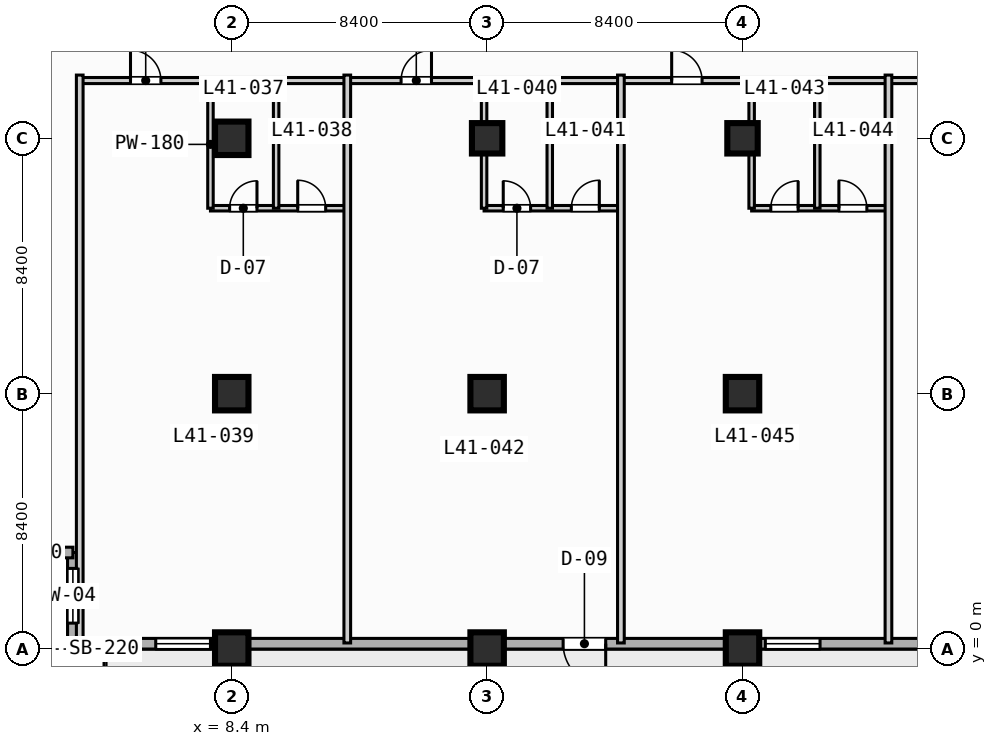
"""IFC4 building model, lengths in metres.
Left out: names, types, materials, properties, quantities, classifications, styles, units other than length and angle.
Written with IfcOpenShell. Run it as: python <this file> out.ifc"""

import sys

from ifc_helpers import new_model, si_unit, direction, frame, frame_2d, origin, origin_2d, place, context, subcontext, project, spatial, rectangle, extrude, element, fill, save


model = new_model("IFC4")
c1 = context("Model", 3, precision=1e-05, world=origin(), true_north=direction((0.0, 1.0)))
c2 = subcontext(c1, "Body", "Model", "MODEL_VIEW")
j1 = project(units=[si_unit("LENGTHUNIT", "METRE"), si_unit("PLANEANGLEUNIT", "RADIAN")], contexts=[c1])
p1 = place(None, origin())
s1 = spatial("IfcSite", under=j1, at=p1, CompositionType="ELEMENT")
p2 = place(p1, origin())
s2 = spatial("IfcBuilding", under=s1, at=p2, CompositionType="ELEMENT")
p3 = place(p2, frame((0.0, 0.0, 171.7)))
s3 = spatial("IfcBuildingStorey", under=s2, at=p3, CompositionType="ELEMENT", Elevation=171.7)
for number, where, z_axis, x_axis in (
    (1, (8.4, 0.0, 0.0), (0.0, 0.0, 1.0), (1.0, 0.0, 0.0)),
    (2, (8.4, 8.4, 0.0), (0.0, 0.0, 1.0), (1.0, 0.0, 0.0)),
    (3, (8.4, 16.8, 0.0), (0.0, 0.0, 1.0), (1.0, 0.0, 0.0)),
    (4, (16.8, 0.0, 0.0), (0.0, 0.0, 1.0), (1.0, 0.0, 0.0)),
    (5, (16.8, 8.4, 0.0), (0.0, 0.0, 1.0), (1.0, 0.0, 0.0)),
):
    element("IfcColumn", number, at=place(p3, frame(where, z_axis=z_axis, x_axis=x_axis)), inside=s3, PredefinedType="COLUMN", context=c2, shape_type="SweptSolid", body=[
        extrude(rectangle(XDim=1.1, YDim=1.1, at=origin_2d()), origin(), (0.0, 0.0, 1.0), 3.7),
    ])
p4 = place(p3, frame((16.8, 16.8, 0.0), z_axis=(0.0, 0.0, 1.0), x_axis=(1.0, 0.0, 0.0)))
e6 = element("IfcColumn", 6, at=p4, inside=s3, PredefinedType="COLUMN", context=c2, shape_type="SweptSolid", body=[
    extrude(rectangle(XDim=1.0, YDim=1.0, at=origin_2d()), origin(), (0.0, 0.0, 1.0), 3.7),
])
for number, where, z_axis, x_axis in (
    (7, (25.2, 0.0, 0.0), (0.0, 0.0, 1.0), (1.0, 0.0, 0.0)),
    (8, (25.2, 8.4, 0.0), (0.0, 0.0, 1.0), (1.0, 0.0, 0.0)),
):
    element("IfcColumn", number, at=place(p3, frame(where, z_axis=z_axis, x_axis=x_axis)), inside=s3, PredefinedType="COLUMN", context=c2, shape_type="SweptSolid", body=[
        extrude(rectangle(XDim=1.1, YDim=1.1, at=origin_2d()), origin(), (0.0, 0.0, 1.0), 3.7),
    ])
p5 = place(p3, frame((25.2, 16.8, 0.0), z_axis=(0.0, 0.0, 1.0), x_axis=(1.0, 0.0, 0.0)))
e9 = element("IfcColumn", 9, at=p5, inside=s3, PredefinedType="COLUMN", context=c2, shape_type="SweptSolid", body=[
    extrude(rectangle(XDim=1.0, YDim=1.0, at=origin_2d()), origin(), (0.0, 0.0, 1.0), 3.7),
])
p6 = place(p3, frame((3.175, 0.175, 0.0), z_axis=(0.0, 0.0, 1.0), x_axis=(0.0, 1.0, 0.0)))
e10 = element("IfcWall", 10, at=p6, inside=s3, PredefinedType="STANDARD", context=c2, shape_type="SweptSolid", body=[
    extrude(rectangle(XDim=3.0, YDim=0.35, at=frame_2d((1.5, 0.0))), origin(), (0.0, 0.0, 1.0), 3.47),
])
p7 = place(p6, frame((0.677, 0.0, 0.85)))
e11 = element("IfcOpeningElement", 11, at=p7, cuts=e10, PredefinedType="OPENING", context=c2, shape_type="SweptSolid", body=[
    extrude(rectangle(XDim=1.8, YDim=1.8, at=frame_2d((0.9, 0.9))), frame((0.0, 0.185, 0.0), z_axis=(0.0, -1.0, 0.0), x_axis=(1.0, 0.0, 0.0)), (0.0, 0.0, 1.0), 0.37),
])
p8 = place(p3, frame((3.175, 3.175, 0.0), z_axis=(0.0, 0.0, 1.0), x_axis=(-1.0, 0.0, 0.0)))
e12 = element("IfcWall", 12, at=p8, inside=s3, PredefinedType="STANDARD", context=c2, shape_type="SweptSolid", body=[
    extrude(rectangle(XDim=3.0, YDim=0.35, at=frame_2d((1.5, 0.0))), origin(), (0.0, 0.0, 1.0), 3.47),
])
p9 = place(p3, frame((72.425, 0.175, 0.0), z_axis=(0.0, 0.0, 1.0), x_axis=(-1.0, 0.0, 0.0)))
e13 = element("IfcWall", 13, at=p9, inside=s3, PredefinedType="STANDARD", context=c2, shape_type="SweptSolid", body=[
    extrude(rectangle(XDim=69.25, YDim=0.35, at=frame_2d((34.625, 0.0))), origin(), (0.0, 0.0, 1.0), 3.47),
])
p10 = place(p9, frame((51.725, 0.0, 0.0)))
e14 = element("IfcOpeningElement", 14, at=p10, cuts=e13, PredefinedType="OPENING", context=c2, shape_type="SweptSolid", body=[
    extrude(rectangle(XDim=1.4, YDim=2.2, at=frame_2d((0.7, 1.1))), frame((0.0, 0.185, 0.0), z_axis=(0.0, -1.0, 0.0), x_axis=(1.0, 0.0, 0.0)), (0.0, 0.0, 1.0), 0.37),
])
p11 = place(p9, frame((33.725, 0.0, 0.85)))
e15 = element("IfcOpeningElement", 15, at=p11, cuts=e13, PredefinedType="OPENING", context=c2, shape_type="SweptSolid", body=[
    extrude(rectangle(XDim=1.8, YDim=1.8, at=frame_2d((0.9, 0.9))), frame((0.0, 0.185, 0.0), z_axis=(0.0, -1.0, 0.0), x_axis=(1.0, 0.0, 0.0)), (0.0, 0.0, 1.0), 0.37),
])
p12 = place(p9, frame((25.025, 0.0, 0.85)))
e16 = element("IfcOpeningElement", 16, at=p12, cuts=e13, PredefinedType="OPENING", context=c2, shape_type="SweptSolid", body=[
    extrude(rectangle(XDim=2.4, YDim=1.95, at=frame_2d((1.2, 0.975))), frame((0.0, 0.185, 0.0), z_axis=(0.0, -1.0, 0.0), x_axis=(1.0, 0.0, 0.0)), (0.0, 0.0, 1.0), 0.37),
])
p13 = place(p9, frame((8.225, 0.0, 0.85)))
e17 = element("IfcOpeningElement", 17, at=p13, cuts=e13, PredefinedType="OPENING", context=c2, shape_type="SweptSolid", body=[
    extrude(rectangle(XDim=2.4, YDim=1.95, at=frame_2d((1.2, 0.975))), frame((0.0, 0.185, 0.0), z_axis=(0.0, -1.0, 0.0), x_axis=(1.0, 0.0, 0.0)), (0.0, 0.0, 1.0), 0.37),
])
p14 = place(p9, frame((64.725, 0.0, 0.85)))
e18 = element("IfcOpeningElement", 18, at=p14, cuts=e13, PredefinedType="OPENING", context=c2, shape_type="SweptSolid", body=[
    extrude(rectangle(XDim=1.8, YDim=1.8, at=frame_2d((0.9, 0.9))), frame((0.0, 0.185, 0.0), z_axis=(0.0, -1.0, 0.0), x_axis=(1.0, 0.0, 0.0)), (0.0, 0.0, 1.0), 0.37),
])
p15 = place(p9, frame((44.675, 0.0, 0.85)))
e19 = element("IfcOpeningElement", 19, at=p15, cuts=e13, PredefinedType="OPENING", context=c2, shape_type="SweptSolid", body=[
    extrude(rectangle(XDim=1.8, YDim=1.8, at=frame_2d((0.9, 0.9))), frame((0.0, 0.185, 0.0), z_axis=(0.0, -1.0, 0.0), x_axis=(1.0, 0.0, 0.0)), (0.0, 0.0, 1.0), 0.37),
])
p16 = place(p3, frame((3.4, 18.7, 0.0), z_axis=(0.0, 0.0, 1.0), x_axis=(1.0, 0.0, 0.0)))
e20 = element("IfcWall", 20, at=p16, inside=s3, PredefinedType="PARTITIONING", context=c2, shape_type="SweptSolid", body=[
    extrude(rectangle(XDim=35.8, YDim=0.2, at=frame_2d((17.9, 0.0))), origin(), (0.0, 0.0, 1.0), 3.47),
])
p17 = place(p16, frame((1.67, 0.0, 0.0)))
e21 = element("IfcOpeningElement", 21, at=p17, cuts=e20, PredefinedType="OPENING", context=c2, shape_type="SweptSolid", body=[
    extrude(rectangle(XDim=1.0, YDim=2.15, at=frame_2d((0.5, 1.075))), frame((0.0, 0.11, 0.0), z_axis=(0.0, -1.0, 0.0), x_axis=(1.0, 0.0, 0.0)), (0.0, 0.0, 1.0), 0.22),
])
p18 = place(p16, frame((10.57, 0.0, 0.0)))
e22 = element("IfcOpeningElement", 22, at=p18, cuts=e20, PredefinedType="OPENING", context=c2, shape_type="SweptSolid", body=[
    extrude(rectangle(XDim=1.0, YDim=2.15, at=frame_2d((0.5, 1.075))), frame((0.0, 0.11, 0.0), z_axis=(0.0, -1.0, 0.0), x_axis=(1.0, 0.0, 0.0)), (0.0, 0.0, 1.0), 0.22),
])
p19 = place(p16, frame((19.47, 0.0, 0.0)))
e23 = element("IfcOpeningElement", 23, at=p19, cuts=e20, PredefinedType="OPENING", context=c2, shape_type="SweptSolid", body=[
    extrude(rectangle(XDim=1.0, YDim=2.15, at=frame_2d((0.5, 1.075))), frame((0.0, 0.11, 0.0), z_axis=(0.0, -1.0, 0.0), x_axis=(1.0, 0.0, 0.0)), (0.0, 0.0, 1.0), 0.22),
])
p20 = place(p16, frame((28.22, 0.0, 0.0)))
e24 = element("IfcOpeningElement", 24, at=p20, cuts=e20, PredefinedType="OPENING", context=c2, shape_type="SweptSolid", body=[
    extrude(rectangle(XDim=1.0, YDim=2.15, at=frame_2d((0.5, 1.075))), frame((0.0, 0.11, 0.0), z_axis=(0.0, -1.0, 0.0), x_axis=(1.0, 0.0, 0.0)), (0.0, 0.0, 1.0), 0.22),
])
p21 = place(p3, frame((3.4, 0.2, 0.0), z_axis=(0.0, 0.0, 1.0), x_axis=(0.0, 1.0, 0.0)))
e25 = element("IfcWall", 25, at=p21, inside=s3, PredefinedType="PARTITIONING", context=c2, shape_type="SweptSolid", body=[
    extrude(rectangle(XDim=18.68, YDim=0.22, at=frame_2d((9.34, 0.0))), origin(), (0.0, 0.0, 1.0), 3.47),
])
p22 = place(p3, frame((7.7, 14.5, 0.0), z_axis=(0.0, 0.0, 1.0), x_axis=(1.0, 0.0, 0.0)))
e26 = element("IfcWall", 26, at=p22, inside=s3, PredefinedType="PLUMBINGWALL", context=c2, shape_type="SweptSolid", body=[
    extrude(rectangle(XDim=4.5, YDim=0.18, at=frame_2d((2.25, 0.0))), origin(), (0.0, 0.0, 1.0), 3.47),
])
p23 = place(p22, frame((0.63, 0.0, 0.0)))
e27 = element("IfcOpeningElement", 27, at=p23, cuts=e26, PredefinedType="OPENING", context=c2, shape_type="SweptSolid", body=[
    extrude(rectangle(XDim=0.9, YDim=2.1, at=frame_2d((0.45, 1.05))), frame((0.0, 0.1, 0.0), z_axis=(0.0, -1.0, 0.0), x_axis=(1.0, 0.0, 0.0)), (0.0, 0.0, 1.0), 0.2),
])
p24 = place(p22, frame((2.87, 0.0, 0.0)))
e28 = element("IfcOpeningElement", 28, at=p24, cuts=e26, PredefinedType="OPENING", context=c2, shape_type="SweptSolid", body=[
    extrude(rectangle(XDim=0.92, YDim=2.1, at=frame_2d((0.46, 1.05))), frame((0.0, 0.1, 0.0), z_axis=(0.0, -1.0, 0.0), x_axis=(1.0, 0.0, 0.0)), (0.0, 0.0, 1.0), 0.2),
])
for number, where, z_axis, x_axis in (
    (29, (7.7, 14.5, 0.0), (0.0, 0.0, 1.0), (0.0, 1.0, 0.0)),
    (30, (9.86, 14.5, 0.0), (0.0, 0.0, 1.0), (0.0, 1.0, 0.0)),
):
    element("IfcWall", number, at=place(p3, frame(where, z_axis=z_axis, x_axis=x_axis)), inside=s3, PredefinedType="PLUMBINGWALL", context=c2, shape_type="SweptSolid", body=[
        extrude(rectangle(XDim=4.2, YDim=0.18, at=frame_2d((2.1, 0.0))), origin(), (0.0, 0.0, 1.0), 3.47),
    ])
p25 = place(p3, frame((12.2, 0.2, 0.0), z_axis=(0.0, 0.0, 1.0), x_axis=(0.0, 1.0, 0.0)))
e31 = element("IfcWall", 31, at=p25, inside=s3, PredefinedType="PARTITIONING", context=c2, shape_type="SweptSolid", body=[
    extrude(rectangle(XDim=18.68, YDim=0.22, at=frame_2d((9.34, 0.0))), origin(), (0.0, 0.0, 1.0), 3.47),
])
p26 = place(p3, frame((16.7, 14.5, 0.0), z_axis=(0.0, 0.0, 1.0), x_axis=(1.0, 0.0, 0.0)))
e32 = element("IfcWall", 32, at=p26, inside=s3, PredefinedType="PLUMBINGWALL", context=c2, shape_type="SweptSolid", body=[
    extrude(rectangle(XDim=4.5, YDim=0.18, at=frame_2d((2.25, 0.0))), origin(), (0.0, 0.0, 1.0), 3.47),
])
p27 = place(p26, frame((0.63, 0.0, 0.0)))
e33 = element("IfcOpeningElement", 33, at=p27, cuts=e32, PredefinedType="OPENING", context=c2, shape_type="SweptSolid", body=[
    extrude(rectangle(XDim=0.9, YDim=2.1, at=frame_2d((0.45, 1.05))), frame((0.0, 0.1, 0.0), z_axis=(0.0, -1.0, 0.0), x_axis=(1.0, 0.0, 0.0)), (0.0, 0.0, 1.0), 0.2),
])
p28 = place(p26, frame((2.87, 0.0, 0.0)))
e34 = element("IfcOpeningElement", 34, at=p28, cuts=e32, PredefinedType="OPENING", context=c2, shape_type="SweptSolid", body=[
    extrude(rectangle(XDim=0.92, YDim=2.1, at=frame_2d((0.46, 1.05))), frame((0.0, 0.1, 0.0), z_axis=(0.0, -1.0, 0.0), x_axis=(1.0, 0.0, 0.0)), (0.0, 0.0, 1.0), 0.2),
])
p29 = place(p3, frame((16.7, 14.5, 0.0), z_axis=(0.0, 0.0, 1.0), x_axis=(0.0, 1.0, 0.0)))
e35 = element("IfcWall", 35, at=p29, inside=s3, PredefinedType="PLUMBINGWALL", context=c2, shape_type="SweptSolid", body=[
    extrude(rectangle(XDim=4.2, YDim=0.18, at=frame_2d((2.1, 0.0))), origin(), (0.0, 0.0, 1.0), 2.82),
])
p30 = place(p3, frame((18.86, 14.5, 0.0), z_axis=(0.0, 0.0, 1.0), x_axis=(0.0, 1.0, 0.0)))
e36 = element("IfcWall", 36, at=p30, inside=s3, PredefinedType="PLUMBINGWALL", context=c2, shape_type="SweptSolid", body=[
    extrude(rectangle(XDim=4.2, YDim=0.18, at=frame_2d((2.1, 0.0))), origin(), (0.0, 0.0, 1.0), 3.47),
])
p31 = place(p3, frame((21.2, 0.2, 0.0), z_axis=(0.0, 0.0, 1.0), x_axis=(0.0, 1.0, 0.0)))
e37 = element("IfcWall", 37, at=p31, inside=s3, PredefinedType="PARTITIONING", context=c2, shape_type="SweptSolid", body=[
    extrude(rectangle(XDim=18.68, YDim=0.22, at=frame_2d((9.34, 0.0))), origin(), (0.0, 0.0, 1.0), 3.47),
])
p32 = place(p3, frame((25.5, 14.5, 0.0), z_axis=(0.0, 0.0, 1.0), x_axis=(1.0, 0.0, 0.0)))
e38 = element("IfcWall", 38, at=p32, inside=s3, PredefinedType="PLUMBINGWALL", context=c2, shape_type="SweptSolid", body=[
    extrude(rectangle(XDim=4.5, YDim=0.18, at=frame_2d((2.25, 0.0))), origin(), (0.0, 0.0, 1.0), 3.47),
])
p33 = place(p32, frame((0.63, 0.0, 0.0)))
e39 = element("IfcOpeningElement", 39, at=p33, cuts=e38, PredefinedType="OPENING", context=c2, shape_type="SweptSolid", body=[
    extrude(rectangle(XDim=0.9, YDim=2.1, at=frame_2d((0.45, 1.05))), frame((0.0, 0.1, 0.0), z_axis=(0.0, -1.0, 0.0), x_axis=(1.0, 0.0, 0.0)), (0.0, 0.0, 1.0), 0.2),
])
p34 = place(p32, frame((2.87, 0.0, 0.0)))
e40 = element("IfcOpeningElement", 40, at=p34, cuts=e38, PredefinedType="OPENING", context=c2, shape_type="SweptSolid", body=[
    extrude(rectangle(XDim=0.92, YDim=2.1, at=frame_2d((0.46, 1.05))), frame((0.0, 0.1, 0.0), z_axis=(0.0, -1.0, 0.0), x_axis=(1.0, 0.0, 0.0)), (0.0, 0.0, 1.0), 0.2),
])
p35 = place(p3, frame((25.5, 14.5, 0.0), z_axis=(0.0, 0.0, 1.0), x_axis=(0.0, 1.0, 0.0)))
e41 = element("IfcWall", 41, at=p35, inside=s3, PredefinedType="PLUMBINGWALL", context=c2, shape_type="SweptSolid", body=[
    extrude(rectangle(XDim=4.2, YDim=0.18, at=frame_2d((2.1, 0.0))), origin(), (0.0, 0.0, 1.0), 2.82),
])
p36 = place(p3, frame((27.66, 14.5, 0.0), z_axis=(0.0, 0.0, 1.0), x_axis=(0.0, 1.0, 0.0)))
e42 = element("IfcWall", 42, at=p36, inside=s3, PredefinedType="PLUMBINGWALL", context=c2, shape_type="SweptSolid", body=[
    extrude(rectangle(XDim=4.2, YDim=0.18, at=frame_2d((2.1, 0.0))), origin(), (0.0, 0.0, 1.0), 3.47),
])
p37 = place(p3, frame((30.0, 0.2, 0.0), z_axis=(0.0, 0.0, 1.0), x_axis=(0.0, 1.0, 0.0)))
e43 = element("IfcWall", 43, at=p37, inside=s3, PredefinedType="PARTITIONING", context=c2, shape_type="SweptSolid", body=[
    extrude(rectangle(XDim=18.68, YDim=0.22, at=frame_2d((9.34, 0.0))), origin(), (0.0, 0.0, 1.0), 3.47),
])
p38 = place(p7, origin())
e44 = element("IfcWindow", 44, at=p38, inside=s3, PartitioningType="SINGLE_PANEL", PredefinedType="WINDOW", context=c2, shape_type="SweptSolid", body=[
    extrude(rectangle(XDim=1.8, YDim=1.8, at=frame_2d((0.9, 0.9))), frame((0.0, 0.03, 0.0), z_axis=(0.0, -1.0, 0.0), x_axis=(1.0, 0.0, 0.0)), (0.0, 0.0, 1.0), 0.06),
])
fill(e11, e44)
p39 = place(p10, origin())
e45 = element("IfcDoor", 45, at=p39, inside=s3, OperationType="SINGLE_SWING_LEFT", PredefinedType="DOOR", context=c2, shape_type="SweptSolid", body=[
    extrude(rectangle(XDim=1.4, YDim=2.2, at=frame_2d((0.7, 1.1))), frame((0.0, 0.025, 0.0), z_axis=(0.0, -1.0, 0.0), x_axis=(1.0, 0.0, 0.0)), (0.0, 0.0, 1.0), 0.05),
])
fill(e14, e45)
p40 = place(p14, origin())
e46 = element("IfcWindow", 46, at=p40, inside=s3, PartitioningType="SINGLE_PANEL", PredefinedType="WINDOW", context=c2, shape_type="SweptSolid", body=[
    extrude(rectangle(XDim=1.8, YDim=1.8, at=frame_2d((0.9, 0.9))), frame((0.0, 0.03, 0.0), z_axis=(0.0, -1.0, 0.0), x_axis=(1.0, 0.0, 0.0)), (0.0, 0.0, 1.0), 0.06),
])
fill(e18, e46)
p41 = place(p15, origin())
e47 = element("IfcWindow", 47, at=p41, inside=s3, PartitioningType="SINGLE_PANEL", PredefinedType="WINDOW", context=c2, shape_type="SweptSolid", body=[
    extrude(rectangle(XDim=1.8, YDim=1.8, at=frame_2d((0.9, 0.9))), frame((0.0, 0.03, 0.0), z_axis=(0.0, -1.0, 0.0), x_axis=(1.0, 0.0, 0.0)), (0.0, 0.0, 1.0), 0.06),
])
fill(e19, e47)
p42 = place(p17, origin())
e48 = element("IfcDoor", 48, at=p42, inside=s3, OperationType="SINGLE_SWING_LEFT", PredefinedType="DOOR", context=c2, shape_type="SweptSolid", body=[
    extrude(rectangle(XDim=1.0, YDim=2.15, at=frame_2d((0.5, 1.075))), frame((0.0, 0.025, 0.0), z_axis=(0.0, -1.0, 0.0), x_axis=(1.0, 0.0, 0.0)), (0.0, 0.0, 1.0), 0.05),
])
fill(e21, e48)
p43 = place(p18, origin())
e49 = element("IfcDoor", 49, at=p43, inside=s3, OperationType="SINGLE_SWING_RIGHT", PredefinedType="DOOR", context=c2, shape_type="SweptSolid", body=[
    extrude(rectangle(XDim=1.0, YDim=2.15, at=frame_2d((0.5, 1.075))), frame((0.0, 0.025, 0.0), z_axis=(0.0, -1.0, 0.0), x_axis=(1.0, 0.0, 0.0)), (0.0, 0.0, 1.0), 0.05),
])
fill(e22, e49)
p44 = place(p19, origin())
e50 = element("IfcDoor", 50, at=p44, inside=s3, OperationType="SINGLE_SWING_LEFT", PredefinedType="DOOR", context=c2, shape_type="SweptSolid", body=[
    extrude(rectangle(XDim=1.0, YDim=2.15, at=frame_2d((0.5, 1.075))), frame((0.0, 0.025, 0.0), z_axis=(0.0, -1.0, 0.0), x_axis=(1.0, 0.0, 0.0)), (0.0, 0.0, 1.0), 0.05),
])
fill(e23, e50)
p45 = place(p23, origin())
e51 = element("IfcDoor", 51, at=p45, inside=s3, OperationType="SINGLE_SWING_RIGHT", PredefinedType="DOOR", context=c2, shape_type="SweptSolid", body=[
    extrude(rectangle(XDim=0.9, YDim=2.1, at=frame_2d((0.45, 1.05))), frame((0.0, 0.025, 0.0), z_axis=(0.0, -1.0, 0.0), x_axis=(1.0, 0.0, 0.0)), (0.0, 0.0, 1.0), 0.05),
])
fill(e27, e51)
p46 = place(p24, origin())
e52 = element("IfcDoor", 52, at=p46, inside=s3, OperationType="SINGLE_SWING_LEFT", PredefinedType="DOOR", context=c2, shape_type="SweptSolid", body=[
    extrude(rectangle(XDim=0.92, YDim=2.1, at=frame_2d((0.46, 1.05))), frame((0.0, 0.025, 0.0), z_axis=(0.0, -1.0, 0.0), x_axis=(1.0, 0.0, 0.0)), (0.0, 0.0, 1.0), 0.05),
])
fill(e28, e52)
p47 = place(p27, origin())
e53 = element("IfcDoor", 53, at=p47, inside=s3, OperationType="SINGLE_SWING_LEFT", PredefinedType="DOOR", context=c2, shape_type="SweptSolid", body=[
    extrude(rectangle(XDim=0.9, YDim=2.1, at=frame_2d((0.45, 1.05))), frame((0.0, 0.025, 0.0), z_axis=(0.0, -1.0, 0.0), x_axis=(1.0, 0.0, 0.0)), (0.0, 0.0, 1.0), 0.05),
])
fill(e33, e53)
p48 = place(p28, origin())
e54 = element("IfcDoor", 54, at=p48, inside=s3, OperationType="SINGLE_SWING_RIGHT", PredefinedType="DOOR", context=c2, shape_type="SweptSolid", body=[
    extrude(rectangle(XDim=0.92, YDim=2.1, at=frame_2d((0.46, 1.05))), frame((0.0, 0.025, 0.0), z_axis=(0.0, -1.0, 0.0), x_axis=(1.0, 0.0, 0.0)), (0.0, 0.0, 1.0), 0.05),
])
fill(e34, e54)
p49 = place(p33, origin())
e55 = element("IfcDoor", 55, at=p49, inside=s3, OperationType="SINGLE_SWING_RIGHT", PredefinedType="DOOR", context=c2, shape_type="SweptSolid", body=[
    extrude(rectangle(XDim=0.9, YDim=2.1, at=frame_2d((0.45, 1.05))), frame((0.0, 0.025, 0.0), z_axis=(0.0, -1.0, 0.0), x_axis=(1.0, 0.0, 0.0)), (0.0, 0.0, 1.0), 0.05),
])
fill(e39, e55)
p50 = place(p34, origin())
e56 = element("IfcDoor", 56, at=p50, inside=s3, OperationType="SINGLE_SWING_LEFT", PredefinedType="DOOR", context=c2, shape_type="SweptSolid", body=[
    extrude(rectangle(XDim=0.92, YDim=2.1, at=frame_2d((0.46, 1.05))), frame((0.0, 0.025, 0.0), z_axis=(0.0, -1.0, 0.0), x_axis=(1.0, 0.0, 0.0)), (0.0, 0.0, 1.0), 0.05),
])
fill(e40, e56)
save(model, sys.argv[1])
